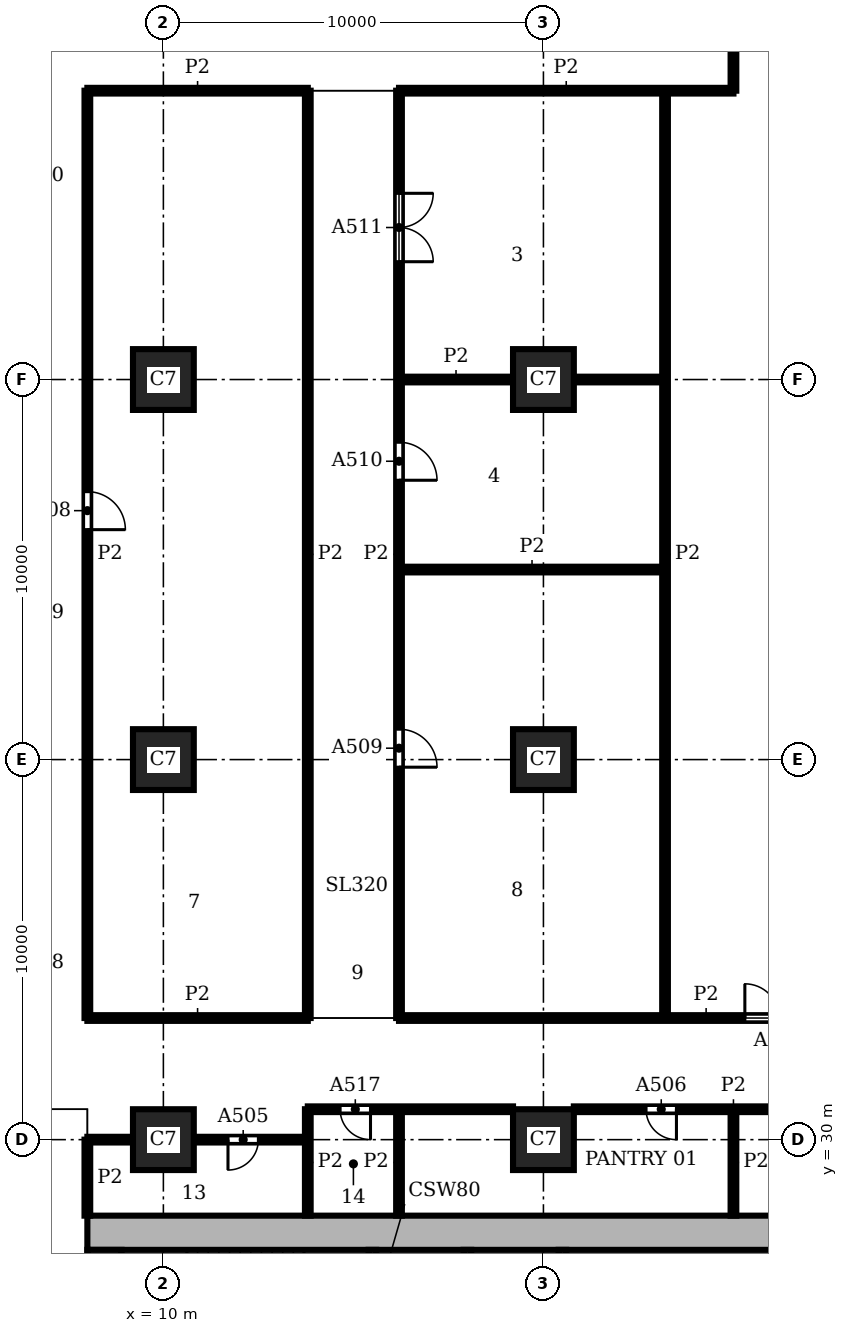
"""IFC4 building model, lengths in metres.
Left out: names, types, materials, properties, quantities, classifications, styles, units other than length and angle.
Written with IfcOpenShell. Run it as: python <this file> out.ifc"""

import sys

from ifc_helpers import new_model, si_unit, direction, frame, frame_2d, origin, origin_2d, place, context, subcontext, project, spatial, rectangle, extrude, element, fill, save


model = new_model("IFC4")
c1 = context("Model", 3, precision=1e-05, world=origin(), true_north=direction((0.0, 1.0)))
c2 = subcontext(c1, "Body", "Model", "MODEL_VIEW")
j1 = project(units=[si_unit("LENGTHUNIT", "METRE"), si_unit("PLANEANGLEUNIT", "RADIAN")], contexts=[c1])
p1 = place(None, origin())
s1 = spatial("IfcSite", under=j1, at=p1, CompositionType="ELEMENT")
p2 = place(p1, origin())
s2 = spatial("IfcBuilding", under=s1, at=p2, CompositionType="ELEMENT")
p3 = place(p2, frame((0.0, 0.0, 58.8)))
s3 = spatial("IfcBuildingStorey", under=s2, at=p3, CompositionType="ELEMENT", Elevation=58.8)
for number, where, z_axis, x_axis in (
    (1, (10.0, 30.0, 0.0), (0.0, 0.0, 1.0), (1.0, 0.0, 0.0)),
    (2, (10.0, 40.0, 0.0), (0.0, 0.0, 1.0), (1.0, 0.0, 0.0)),
    (3, (10.0, 50.0, 0.0), (0.0, 0.0, 1.0), (1.0, 0.0, 0.0)),
    (4, (20.0, 30.0, 0.0), (0.0, 0.0, 1.0), (1.0, 0.0, 0.0)),
    (5, (20.0, 40.0, 0.0), (0.0, 0.0, 1.0), (1.0, 0.0, 0.0)),
    (6, (20.0, 50.0, 0.0), (0.0, 0.0, 1.0), (1.0, 0.0, 0.0)),
):
    element("IfcColumn", number, at=place(p3, frame(where, z_axis=z_axis, x_axis=x_axis)), inside=s3, PredefinedType="COLUMN", context=c2, shape_type="SweptSolid", body=[
        extrude(rectangle(XDim=1.6, YDim=1.6, at=origin_2d()), origin(), (0.0, 0.0, 1.0), 3.9),
    ])
p4 = place(p3, frame((28.0, 27.55, 0.0), z_axis=(0.0, 0.0, 1.0), x_axis=(-1.0, 0.0, 0.0)))
e7 = element("IfcWall", 7, at=p4, inside=s3, PredefinedType="SHEAR", context=c2, shape_type="SweptSolid", body=[
    extrude(rectangle(XDim=20.0, YDim=0.9, at=frame_2d((10.0, 0.0))), origin(), (0.0, 0.0, 1.0), 3.9),
])
p5 = place(p3, frame((8.45, 27.1, 0.0), z_axis=(0.0, 0.0, 1.0), x_axis=(0.0, -1.0, 0.0)))
e8 = element("IfcWall", 8, at=p5, inside=s3, PredefinedType="SHEAR", context=c2, shape_type="SweptSolid", body=[
    extrude(rectangle(XDim=18.2, YDim=0.9, at=frame_2d((9.1, 0.0))), origin(), (0.0, 0.0, 1.0), 3.9),
])
p6 = place(p3, frame((15.5, 23.6, 0.0), z_axis=(0.0, 0.0, 1.0), x_axis=(0.0, 1.0, 0.0)))
e9 = element("IfcWall", 9, at=p6, inside=s3, PredefinedType="SHEAR", context=c2, shape_type="SweptSolid", body=[
    extrude(rectangle(XDim=3.5, YDim=0.2, at=frame_2d((1.75, 0.0))), origin(), (0.0, 0.0, 1.0), 3.58),
])
p7 = place(p3, frame((18.0, 20.0, 0.0), z_axis=(0.0, 0.0, 1.0), x_axis=(0.0, 1.0, 0.0)))
e10 = element("IfcWall", 10, at=p7, inside=s3, PredefinedType="SHEAR", context=c2, shape_type="SweptSolid", body=[
    extrude(rectangle(XDim=7.1, YDim=0.2, at=frame_2d((3.55, 0.0))), origin(), (0.0, 0.0, 1.0), 3.58),
])
p8 = place(p7, frame((1.2, 0.0, 0.0)))
e11 = element("IfcOpeningElement", 11, at=p8, cuts=e10, PredefinedType="OPENING", context=c2, shape_type="SweptSolid", body=[
    extrude(rectangle(XDim=1.2, YDim=2.1, at=frame_2d((0.6, 1.05))), frame((0.0, 0.11, 0.0), z_axis=(0.0, -1.0, 0.0), x_axis=(1.0, 0.0, 0.0)), (0.0, 0.0, 1.0), 0.22),
])
p9 = place(p3, frame((20.5, 23.6, 0.0), z_axis=(0.0, 0.0, 1.0), x_axis=(0.0, 1.0, 0.0)))
e12 = element("IfcWall", 12, at=p9, inside=s3, PredefinedType="SHEAR", context=c2, shape_type="SweptSolid", body=[
    extrude(rectangle(XDim=3.5, YDim=0.2, at=frame_2d((1.75, 0.0))), origin(), (0.0, 0.0, 1.0), 3.58),
])
p10 = place(p3, frame((8.0, 28.0, 0.0), z_axis=(0.0, 0.0, 1.0), x_axis=(0.0, 1.0, 0.0)))
e13 = element("IfcWall", 13, at=p10, inside=s3, PredefinedType="PARTITIONING", context=c2, shape_type="SweptSolid", body=[
    extrude(rectangle(XDim=2.0, YDim=0.15, at=frame_2d((1.0, 0.0))), origin(), (0.0, 0.0, 1.0), 3.58),
])
p11 = place(p3, frame((8.0, 33.2, 0.0), z_axis=(0.0, 0.0, 1.0), x_axis=(0.0, 1.0, 0.0)))
e14 = element("IfcWall", 14, at=p11, inside=s3, PredefinedType="PARTITIONING", context=c2, shape_type="SweptSolid", body=[
    extrude(rectangle(XDim=24.4, YDim=0.15, at=frame_2d((12.2, 0.0))), origin(), (0.0, 0.0, 1.0), 3.58),
])
p12 = place(p11, frame((12.85, 0.0, 0.0)))
e15 = element("IfcOpeningElement", 15, at=p12, cuts=e14, PredefinedType="OPENING", context=c2, shape_type="SweptSolid", body=[
    extrude(rectangle(XDim=1.0, YDim=2.1, at=frame_2d((0.5, 1.05))), frame((0.0, 0.085, 0.0), z_axis=(0.0, -1.0, 0.0), x_axis=(1.0, 0.0, 0.0)), (0.0, 0.0, 1.0), 0.17),
])
p13 = place(p3, frame((13.8, 28.0, 0.0), z_axis=(0.0, 0.0, 1.0), x_axis=(0.0, 1.0, 0.0)))
e16 = element("IfcWall", 16, at=p13, inside=s3, PredefinedType="PARTITIONING", context=c2, shape_type="SweptSolid", body=[
    extrude(rectangle(XDim=2.8, YDim=0.15, at=frame_2d((1.4, 0.0))), origin(), (0.0, 0.0, 1.0), 3.58),
])
p14 = place(p3, frame((13.8, 33.2, 0.0), z_axis=(0.0, 0.0, 1.0), x_axis=(0.0, 1.0, 0.0)))
e17 = element("IfcWall", 17, at=p14, inside=s3, PredefinedType="PARTITIONING", context=c2, shape_type="SweptSolid", body=[
    extrude(rectangle(XDim=24.4, YDim=0.15, at=frame_2d((12.2, 0.0))), origin(), (0.0, 0.0, 1.0), 3.58),
])
p15 = place(p3, frame((16.2, 28.0, 0.0), z_axis=(0.0, 0.0, 1.0), x_axis=(0.0, 1.0, 0.0)))
e18 = element("IfcWall", 18, at=p15, inside=s3, PredefinedType="PARTITIONING", context=c2, shape_type="SweptSolid", body=[
    extrude(rectangle(XDim=2.8, YDim=0.15, at=frame_2d((1.4, 0.0))), origin(), (0.0, 0.0, 1.0), 3.58),
])
p16 = place(p3, frame((16.2, 33.2, 0.0), z_axis=(0.0, 0.0, 1.0), x_axis=(0.0, 1.0, 0.0)))
e19 = element("IfcWall", 19, at=p16, inside=s3, PredefinedType="PARTITIONING", context=c2, shape_type="SweptSolid", body=[
    extrude(rectangle(XDim=24.4, YDim=0.15, at=frame_2d((12.2, 0.0))), origin(), (0.0, 0.0, 1.0), 3.58),
])
p17 = place(p16, frame((6.6, 0.0, 0.0)))
e20 = element("IfcOpeningElement", 20, at=p17, cuts=e19, PredefinedType="OPENING", context=c2, shape_type="SweptSolid", body=[
    extrude(rectangle(XDim=1.0, YDim=2.1, at=frame_2d((0.5, 1.05))), frame((0.0, 0.085, 0.0), z_axis=(0.0, -1.0, 0.0), x_axis=(1.0, 0.0, 0.0)), (0.0, 0.0, 1.0), 0.17),
])
p18 = place(p16, frame((14.15, 0.0, 0.0)))
e21 = element("IfcOpeningElement", 21, at=p18, cuts=e19, PredefinedType="OPENING", context=c2, shape_type="SweptSolid", body=[
    extrude(rectangle(XDim=1.0, YDim=2.1, at=frame_2d((0.5, 1.05))), frame((0.0, 0.085, 0.0), z_axis=(0.0, -1.0, 0.0), x_axis=(1.0, 0.0, 0.0)), (0.0, 0.0, 1.0), 0.17),
])
p19 = place(p16, frame((19.9, 0.0, 0.0)))
e22 = element("IfcOpeningElement", 22, at=p19, cuts=e19, PredefinedType="OPENING", context=c2, shape_type="SweptSolid", body=[
    extrude(rectangle(XDim=1.8, YDim=2.1, at=frame_2d((0.9, 1.05))), frame((0.0, 0.085, 0.0), z_axis=(0.0, -1.0, 0.0), x_axis=(1.0, 0.0, 0.0)), (0.0, 0.0, 1.0), 0.17),
])
p20 = place(p3, frame((23.2, 33.2, 0.0), z_axis=(0.0, 0.0, 1.0), x_axis=(0.0, 1.0, 0.0)))
e23 = element("IfcWall", 23, at=p20, inside=s3, PredefinedType="PARTITIONING", context=c2, shape_type="SweptSolid", body=[
    extrude(rectangle(XDim=24.4, YDim=0.15, at=frame_2d((12.2, 0.0))), origin(), (0.0, 0.0, 1.0), 3.58),
])
p21 = place(p3, frame((25.0, 28.0, 0.0), z_axis=(0.0, 0.0, 1.0), x_axis=(0.0, 1.0, 0.0)))
e24 = element("IfcWall", 24, at=p21, inside=s3, PredefinedType="PARTITIONING", context=c2, shape_type="SweptSolid", body=[
    extrude(rectangle(XDim=2.8, YDim=0.15, at=frame_2d((1.4, 0.0))), origin(), (0.0, 0.0, 1.0), 3.58),
])
p22 = place(p3, frame((25.0, 57.6, 0.0), z_axis=(0.0, 0.0, 1.0), x_axis=(0.0, 1.0, 0.0)))
e25 = element("IfcWall", 25, at=p22, inside=s3, PredefinedType="PARTITIONING", context=c2, shape_type="SweptSolid", body=[
    extrude(rectangle(XDim=10.4, YDim=0.15, at=frame_2d((5.2, 0.0))), origin(), (0.0, 0.0, 1.0), 3.58),
])
p23 = place(p3, frame((8.0, 30.0, 0.0), z_axis=(0.0, 0.0, 1.0), x_axis=(1.0, 0.0, 0.0)))
e26 = element("IfcWall", 26, at=p23, inside=s3, PredefinedType="PARTITIONING", context=c2, shape_type="SweptSolid", body=[
    extrude(rectangle(XDim=1.2, YDim=0.15, at=frame_2d((0.6, 0.0))), origin(), (0.0, 0.0, 1.0), 3.58),
])
p24 = place(p3, frame((10.8, 30.0, 0.0), z_axis=(0.0, 0.0, 1.0), x_axis=(1.0, 0.0, 0.0)))
e27 = element("IfcWall", 27, at=p24, inside=s3, PredefinedType="PARTITIONING", context=c2, shape_type="SweptSolid", body=[
    extrude(rectangle(XDim=3.0, YDim=0.15, at=frame_2d((1.5, 0.0))), origin(), (0.0, 0.0, 1.0), 3.58),
])
p25 = place(p24, frame((0.9, 0.0, 0.0)))
e28 = element("IfcOpeningElement", 28, at=p25, cuts=e27, PredefinedType="OPENING", context=c2, shape_type="SweptSolid", body=[
    extrude(rectangle(XDim=0.8, YDim=2.1, at=frame_2d((0.4, 1.05))), frame((0.0, 0.085, 0.0), z_axis=(0.0, -1.0, 0.0), x_axis=(1.0, 0.0, 0.0)), (0.0, 0.0, 1.0), 0.17),
])
p26 = place(p3, frame((13.8, 30.8, 0.0), z_axis=(0.0, 0.0, 1.0), x_axis=(1.0, 0.0, 0.0)))
e29 = element("IfcWall", 29, at=p26, inside=s3, PredefinedType="PARTITIONING", context=c2, shape_type="SweptSolid", body=[
    extrude(rectangle(XDim=5.4, YDim=0.15, at=frame_2d((2.7, 0.0))), origin(), (0.0, 0.0, 1.0), 3.58),
])
p27 = place(p26, frame((0.85, 0.0, 0.0)))
e30 = element("IfcOpeningElement", 30, at=p27, cuts=e29, PredefinedType="OPENING", context=c2, shape_type="SweptSolid", body=[
    extrude(rectangle(XDim=0.8, YDim=2.1, at=frame_2d((0.4, 1.05))), frame((0.0, 0.085, 0.0), z_axis=(0.0, -1.0, 0.0), x_axis=(1.0, 0.0, 0.0)), (0.0, 0.0, 1.0), 0.17),
])
p28 = place(p3, frame((20.8, 30.8, 0.0), z_axis=(0.0, 0.0, 1.0), x_axis=(1.0, 0.0, 0.0)))
e31 = element("IfcWall", 31, at=p28, inside=s3, PredefinedType="PARTITIONING", context=c2, shape_type="SweptSolid", body=[
    extrude(rectangle(XDim=8.4, YDim=0.15, at=frame_2d((4.2, 0.0))), origin(), (0.0, 0.0, 1.0), 3.58),
])
p29 = place(p28, frame((1.9, 0.0, 0.0)))
e32 = element("IfcOpeningElement", 32, at=p29, cuts=e31, PredefinedType="OPENING", context=c2, shape_type="SweptSolid", body=[
    extrude(rectangle(XDim=0.8, YDim=2.1, at=frame_2d((0.4, 1.05))), frame((0.0, 0.085, 0.0), z_axis=(0.0, -1.0, 0.0), x_axis=(1.0, 0.0, 0.0)), (0.0, 0.0, 1.0), 0.17),
])
p30 = place(p28, frame((5.8, 0.0, 0.0)))
e33 = element("IfcOpeningElement", 33, at=p30, cuts=e31, PredefinedType="OPENING", context=c2, shape_type="SweptSolid", body=[
    extrude(rectangle(XDim=1.1, YDim=2.1, at=frame_2d((0.55, 1.05))), frame((0.0, 0.085, 0.0), z_axis=(0.0, -1.0, 0.0), x_axis=(1.0, 0.0, 0.0)), (0.0, 0.0, 1.0), 0.17),
])
p31 = place(p3, frame((8.0, 33.2, 0.0), z_axis=(0.0, 0.0, 1.0), x_axis=(1.0, 0.0, 0.0)))
e34 = element("IfcWall", 34, at=p31, inside=s3, PredefinedType="PARTITIONING", context=c2, shape_type="SweptSolid", body=[
    extrude(rectangle(XDim=5.8, YDim=0.15, at=frame_2d((2.9, 0.0))), origin(), (0.0, 0.0, 1.0), 3.58),
])
p32 = place(p3, frame((16.2, 33.2, 0.0), z_axis=(0.0, 0.0, 1.0), x_axis=(1.0, 0.0, 0.0)))
e35 = element("IfcWall", 35, at=p32, inside=s3, PredefinedType="PARTITIONING", context=c2, shape_type="SweptSolid", body=[
    extrude(rectangle(XDim=16.162, YDim=0.15, at=frame_2d((8.081, 0.0))), origin(), (0.0, 0.0, 1.0), 3.58),
])
p33 = place(p32, frame((9.1, 0.0, 0.0)))
e36 = element("IfcOpeningElement", 36, at=p33, cuts=e35, PredefinedType="OPENING", context=c2, shape_type="SweptSolid", body=[
    extrude(rectangle(XDim=1.8, YDim=2.1, at=frame_2d((0.9, 1.05))), frame((0.0, 0.085, 0.0), z_axis=(0.0, -1.0, 0.0), x_axis=(1.0, 0.0, 0.0)), (0.0, 0.0, 1.0), 0.17),
])
p34 = place(p32, frame((14.75, 0.0, 0.0)))
e37 = element("IfcOpeningElement", 37, at=p34, cuts=e35, PredefinedType="OPENING", context=c2, shape_type="SweptSolid", body=[
    extrude(rectangle(XDim=1.0, YDim=2.1, at=frame_2d((0.5, 1.05))), frame((0.0, 0.085, 0.0), z_axis=(0.0, -1.0, 0.0), x_axis=(1.0, 0.0, 0.0)), (0.0, 0.0, 1.0), 0.17),
])
p35 = place(p3, frame((16.2, 45.0, 0.0), z_axis=(0.0, 0.0, 1.0), x_axis=(1.0, 0.0, 0.0)))
e38 = element("IfcWall", 38, at=p35, inside=s3, PredefinedType="PARTITIONING", context=c2, shape_type="SweptSolid", body=[
    extrude(rectangle(XDim=7.0, YDim=0.15, at=frame_2d((3.5, 0.0))), origin(), (0.0, 0.0, 1.0), 3.58),
])
p36 = place(p3, frame((16.2, 50.0, 0.0), z_axis=(0.0, 0.0, 1.0), x_axis=(1.0, 0.0, 0.0)))
e39 = element("IfcWall", 39, at=p36, inside=s3, PredefinedType="PARTITIONING", context=c2, shape_type="SweptSolid", body=[
    extrude(rectangle(XDim=3.0, YDim=0.15, at=frame_2d((1.5, 0.0))), origin(), (0.0, 0.0, 1.0), 3.58),
])
p37 = place(p3, frame((20.8, 50.0, 0.0), z_axis=(0.0, 0.0, 1.0), x_axis=(1.0, 0.0, 0.0)))
e40 = element("IfcWall", 40, at=p37, inside=s3, PredefinedType="PARTITIONING", context=c2, shape_type="SweptSolid", body=[
    extrude(rectangle(XDim=2.4, YDim=0.15, at=frame_2d((1.2, 0.0))), origin(), (0.0, 0.0, 1.0), 3.58),
])
p38 = place(p3, frame((8.0, 57.6, 0.0), z_axis=(0.0, 0.0, 1.0), x_axis=(1.0, 0.0, 0.0)))
e41 = element("IfcWall", 41, at=p38, inside=s3, PredefinedType="PARTITIONING", context=c2, shape_type="SweptSolid", body=[
    extrude(rectangle(XDim=5.8, YDim=0.15, at=frame_2d((2.9, 0.0))), origin(), (0.0, 0.0, 1.0), 3.58),
])
p39 = place(p3, frame((16.2, 57.6, 0.0), z_axis=(0.0, 0.0, 1.0), x_axis=(1.0, 0.0, 0.0)))
e42 = element("IfcWall", 42, at=p39, inside=s3, PredefinedType="PARTITIONING", context=c2, shape_type="SweptSolid", body=[
    extrude(rectangle(XDim=8.8, YDim=0.15, at=frame_2d((4.4, 0.0))), origin(), (0.0, 0.0, 1.0), 3.58),
])
p40 = place(p25, frame((0.8, 0.0, 0.0), z_axis=(0.0, 0.0, 1.0), x_axis=(-1.0, 0.0, 0.0)))
e43 = element("IfcDoor", 43, at=p40, inside=s3, OperationType="SINGLE_SWING_RIGHT", PredefinedType="DOOR", context=c2, shape_type="SweptSolid", body=[
    extrude(rectangle(XDim=0.8, YDim=2.1, at=frame_2d((0.4, 1.05))), frame((0.0, 0.025, 0.0), z_axis=(0.0, -1.0, 0.0), x_axis=(1.0, 0.0, 0.0)), (0.0, 0.0, 1.0), 0.05),
])
fill(e28, e43)
p41 = place(p29, frame((0.8, 0.0, 0.0), z_axis=(0.0, 0.0, 1.0), x_axis=(-1.0, 0.0, 0.0)))
e44 = element("IfcDoor", 44, at=p41, inside=s3, OperationType="SINGLE_SWING_LEFT", PredefinedType="DOOR", context=c2, shape_type="SweptSolid", body=[
    extrude(rectangle(XDim=0.8, YDim=2.1, at=frame_2d((0.4, 1.05))), frame((0.0, 0.025, 0.0), z_axis=(0.0, -1.0, 0.0), x_axis=(1.0, 0.0, 0.0)), (0.0, 0.0, 1.0), 0.05),
])
fill(e32, e44)
p42 = place(p12, frame((1.0, 0.0, 0.0), z_axis=(0.0, 0.0, 1.0), x_axis=(-1.0, 0.0, 0.0)))
e45 = element("IfcDoor", 45, at=p42, inside=s3, OperationType="SINGLE_SWING_RIGHT", PredefinedType="DOOR", context=c2, shape_type="SweptSolid", body=[
    extrude(rectangle(XDim=1.0, YDim=2.1, at=frame_2d((0.5, 1.05))), frame((0.0, 0.025, 0.0), z_axis=(0.0, -1.0, 0.0), x_axis=(1.0, 0.0, 0.0)), (0.0, 0.0, 1.0), 0.05),
])
fill(e15, e45)
p43 = place(p17, frame((1.0, 0.0, 0.0), z_axis=(0.0, 0.0, 1.0), x_axis=(-1.0, 0.0, 0.0)))
e46 = element("IfcDoor", 46, at=p43, inside=s3, OperationType="SINGLE_SWING_RIGHT", PredefinedType="DOOR", context=c2, shape_type="SweptSolid", body=[
    extrude(rectangle(XDim=1.0, YDim=2.1, at=frame_2d((0.5, 1.05))), frame((0.0, 0.025, 0.0), z_axis=(0.0, -1.0, 0.0), x_axis=(1.0, 0.0, 0.0)), (0.0, 0.0, 1.0), 0.05),
])
fill(e20, e46)
p44 = place(p18, frame((1.0, 0.0, 0.0), z_axis=(0.0, 0.0, 1.0), x_axis=(-1.0, 0.0, 0.0)))
e47 = element("IfcDoor", 47, at=p44, inside=s3, OperationType="SINGLE_SWING_RIGHT", PredefinedType="DOOR", context=c2, shape_type="SweptSolid", body=[
    extrude(rectangle(XDim=1.0, YDim=2.1, at=frame_2d((0.5, 1.05))), frame((0.0, 0.025, 0.0), z_axis=(0.0, -1.0, 0.0), x_axis=(1.0, 0.0, 0.0)), (0.0, 0.0, 1.0), 0.05),
])
fill(e21, e47)
p45 = place(p19, frame((1.8, 0.0, 0.0), z_axis=(0.0, 0.0, 1.0), x_axis=(-1.0, 0.0, 0.0)))
e48 = element("IfcDoor", 48, at=p45, inside=s3, OperationType="DOUBLE_DOOR_SINGLE_SWING", PredefinedType="DOOR", context=c2, shape_type="SweptSolid", body=[
    extrude(rectangle(XDim=1.8, YDim=2.1, at=frame_2d((0.9, 1.05))), frame((0.0, 0.025, 0.0), z_axis=(0.0, -1.0, 0.0), x_axis=(1.0, 0.0, 0.0)), (0.0, 0.0, 1.0), 0.05),
])
fill(e22, e48)
p46 = place(p33, origin())
e49 = element("IfcDoor", 49, at=p46, inside=s3, OperationType="DOUBLE_DOOR_SINGLE_SWING", PredefinedType="DOOR", context=c2, shape_type="SweptSolid", body=[
    extrude(rectangle(XDim=1.8, YDim=2.1, at=frame_2d((0.9, 1.05))), frame((0.0, 0.025, 0.0), z_axis=(0.0, -1.0, 0.0), x_axis=(1.0, 0.0, 0.0)), (0.0, 0.0, 1.0), 0.05),
])
fill(e36, e49)
p47 = place(p27, frame((0.8, 0.0, 0.0), z_axis=(0.0, 0.0, 1.0), x_axis=(-1.0, 0.0, 0.0)))
e50 = element("IfcDoor", 50, at=p47, inside=s3, OperationType="SINGLE_SWING_LEFT", PredefinedType="DOOR", context=c2, shape_type="SweptSolid", body=[
    extrude(rectangle(XDim=0.8, YDim=2.1, at=frame_2d((0.4, 1.05))), frame((0.0, 0.025, 0.0), z_axis=(0.0, -1.0, 0.0), x_axis=(1.0, 0.0, 0.0)), (0.0, 0.0, 1.0), 0.05),
])
fill(e30, e50)
save(model, sys.argv[1])
